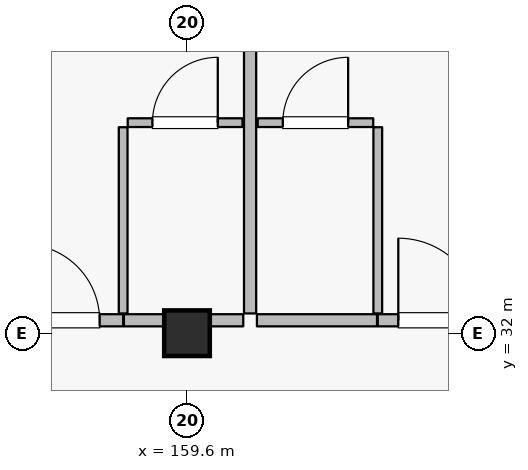
"""IFC4 building model, lengths in metres.
Left out: names, types, materials, properties, quantities, classifications, styles, units other than length and angle.
Written with IfcOpenShell. Run it as: python <this file> out.ifc"""

import sys

from ifc_helpers import new_model, si_unit, direction, frame, frame_2d, origin, origin_2d, place, context, subcontext, project, spatial, rectangle, extrude, element, fill, save


model = new_model("IFC4")
c1 = context("Model", 3, precision=1e-05, world=origin(), true_north=direction((0.0, 1.0)))
c2 = subcontext(c1, "Body", "Model", "MODEL_VIEW")
j1 = project(units=[si_unit("LENGTHUNIT", "METRE"), si_unit("PLANEANGLEUNIT", "RADIAN")], contexts=[c1])
p1 = place(None, origin())
s1 = spatial("IfcSite", under=j1, at=p1, CompositionType="ELEMENT")
p2 = place(p1, origin())
s2 = spatial("IfcBuilding", under=s1, at=p2, CompositionType="ELEMENT")
p3 = place(p2, frame((0.0, 0.0, 43.2)))
s3 = spatial("IfcBuildingStorey", under=s2, at=p3, CompositionType="ELEMENT", Elevation=43.2)
p4 = place(p3, frame((159.6, 32.0, 0.0), z_axis=(0.0, 0.0, 1.0), x_axis=(1.0, 0.0, 0.0)))
e1 = element("IfcColumn", 1, at=p4, inside=s3, PredefinedType="COLUMN", context=c2, shape_type="SweptSolid", body=[
    extrude(rectangle(XDim=0.6, YDim=0.6, at=origin_2d()), origin(), (0.0, 0.0, 1.0), 4.2),
])
p5 = place(p3, frame((157.14, 32.17, 0.0), z_axis=(0.0, 0.0, 1.0), x_axis=(1.0, 0.0, 0.0)))
e2 = element("IfcWall", 2, at=p5, inside=s3, PredefinedType="PARTITIONING", context=c2, shape_type="SweptSolid", body=[
    extrude(rectangle(XDim=1.62, YDim=0.16, at=frame_2d((0.81, 0.0))), origin(), (0.0, 0.0, 1.0), 3.39),
])
p6 = place(p5, frame((0.31, 0.0, 0.0)))
e3 = element("IfcOpeningElement", 3, at=p6, cuts=e2, PredefinedType="OPENING", context=c2, shape_type="SweptSolid", body=[
    extrude(rectangle(XDim=1.0, YDim=2.25, at=frame_2d((0.5, 1.125))), frame((0.0, 0.09, 0.0), z_axis=(0.0, -1.0, 0.0), x_axis=(1.0, 0.0, 0.0)), (0.0, 0.0, 1.0), 0.18),
])
p7 = place(p3, frame((158.77, 32.17, 0.0), z_axis=(0.0, 0.0, 1.0), x_axis=(1.0, 0.0, 0.0)))
e4 = element("IfcWall", 4, at=p7, inside=s3, PredefinedType="PARTITIONING", context=c2, shape_type="SweptSolid", body=[
    extrude(rectangle(XDim=0.534, YDim=0.16, at=frame_2d((0.267, 0.0))), origin(), (0.0, 0.0, 1.0), 3.39),
])
p8 = place(p3, frame((158.76, 32.26, 0.0), z_axis=(0.0, 0.0, 1.0), x_axis=(0.0, 1.0, 0.0)))
e5 = element("IfcWall", 5, at=p8, inside=s3, PredefinedType="PARTITIONING", context=c2, shape_type="SweptSolid", body=[
    extrude(rectangle(XDim=2.45, YDim=0.115, at=frame_2d((1.225, 0.0))), origin(), (0.0, 0.0, 1.0), 3.935),
])
p9 = place(p3, frame((158.82, 34.77, 0.0), z_axis=(0.0, 0.0, 1.0), x_axis=(1.0, 0.0, 0.0)))
e6 = element("IfcWall", 6, at=p9, inside=s3, PredefinedType="PARTITIONING", context=c2, shape_type="SweptSolid", body=[
    extrude(rectangle(XDim=1.51, YDim=0.115, at=frame_2d((0.755, 0.0))), origin(), (0.0, 0.0, 1.0), 3.935),
])
p10 = place(p9, frame((0.325, 0.0, 0.0)))
e7 = element("IfcOpeningElement", 7, at=p10, cuts=e6, PredefinedType="OPENING", context=c2, shape_type="SweptSolid", body=[
    extrude(rectangle(XDim=0.86, YDim=2.12, at=frame_2d((0.43, 1.06))), frame((0.0, 0.067, 0.0), z_axis=(0.0, -1.0, 0.0), x_axis=(1.0, 0.0, 0.0)), (0.0, 0.0, 1.0), 0.135),
])
p11 = place(p3, frame((160.52, 32.17, 0.0), z_axis=(0.0, 0.0, 1.0), x_axis=(1.0, 0.0, 0.0)))
e8 = element("IfcWall", 8, at=p11, inside=s3, PredefinedType="PARTITIONING", context=c2, shape_type="SweptSolid", body=[
    extrude(rectangle(XDim=1.58, YDim=0.16, at=frame_2d((0.79, 0.0))), origin(), (0.0, 0.0, 1.0), 3.935),
])
p12 = place(p3, frame((162.11, 32.17, 0.0), z_axis=(0.0, 0.0, 1.0), x_axis=(1.0, 0.0, 0.0)))
e9 = element("IfcWall", 9, at=p12, inside=s3, PredefinedType="PARTITIONING", context=c2, shape_type="SweptSolid", body=[
    extrude(rectangle(XDim=1.62, YDim=0.16, at=frame_2d((0.81, 0.0))), origin(), (0.0, 0.0, 1.0), 3.935),
])
p13 = place(p12, frame((0.27, 0.0, 0.0)))
e10 = element("IfcOpeningElement", 10, at=p13, cuts=e9, PredefinedType="OPENING", context=c2, shape_type="SweptSolid", body=[
    extrude(rectangle(XDim=1.08, YDim=2.3, at=frame_2d((0.54, 1.15))), frame((0.0, 0.09, 0.0), z_axis=(0.0, -1.0, 0.0), x_axis=(1.0, 0.0, 0.0)), (0.0, 0.0, 1.0), 0.18),
])
p14 = place(p3, frame((162.11, 32.26, 0.0), z_axis=(0.0, 0.0, 1.0), x_axis=(0.0, 1.0, 0.0)))
e11 = element("IfcWall", 11, at=p14, inside=s3, PredefinedType="PARTITIONING", context=c2, shape_type="SweptSolid", body=[
    extrude(rectangle(XDim=2.45, YDim=0.115, at=frame_2d((1.225, 0.0))), origin(), (0.0, 0.0, 1.0), 3.935),
])
p15 = place(p3, frame((160.53, 34.77, 0.0), z_axis=(0.0, 0.0, 1.0), x_axis=(1.0, 0.0, 0.0)))
e12 = element("IfcWall", 12, at=p15, inside=s3, PredefinedType="PARTITIONING", context=c2, shape_type="SweptSolid", body=[
    extrude(rectangle(XDim=1.52, YDim=0.115, at=frame_2d((0.76, 0.0))), origin(), (0.0, 0.0, 1.0), 3.935),
])
p16 = place(p15, frame((0.33, 0.0, 0.0)))
e13 = element("IfcOpeningElement", 13, at=p16, cuts=e12, PredefinedType="OPENING", context=c2, shape_type="SweptSolid", body=[
    extrude(rectangle(XDim=0.86, YDim=2.12, at=frame_2d((0.43, 1.06))), frame((0.0, 0.067, 0.0), z_axis=(0.0, -1.0, 0.0), x_axis=(1.0, 0.0, 0.0)), (0.0, 0.0, 1.0), 0.135),
])
p17 = place(p3, frame((160.43, 32.26, 0.0), z_axis=(0.0, 0.0, 1.0), x_axis=(0.0, 1.0, 0.0)))
e14 = element("IfcWall", 14, at=p17, inside=s3, PredefinedType="PARTITIONING", context=c2, shape_type="SweptSolid", body=[
    extrude(rectangle(XDim=8.19, YDim=0.16, at=frame_2d((4.095, 0.0))), origin(), (0.0, 0.0, 1.0), 3.935),
])
p18 = place(p3, frame((159.304, 32.17, 0.0), z_axis=(0.0, 0.0, 1.0), x_axis=(1.0, 0.0, 0.0)))
e15 = element("IfcWall", 15, at=p18, inside=s3, PredefinedType="PARTITIONING", context=c2, shape_type="SweptSolid", body=[
    extrude(rectangle(XDim=1.036, YDim=0.16, at=frame_2d((0.518, 0.0))), origin(), (0.0, 0.0, 1.0), 3.935),
])
p19 = place(p6, origin())
e16 = element("IfcDoor", 16, at=p19, inside=s3, OperationType="SINGLE_SWING_LEFT", PredefinedType="DOOR", context=c2, shape_type="SweptSolid", body=[
    extrude(rectangle(XDim=1.0, YDim=2.25, at=frame_2d((0.5, 1.125))), frame((0.0, 0.025, 0.0), z_axis=(0.0, -1.0, 0.0), x_axis=(1.0, 0.0, 0.0)), (0.0, 0.0, 1.0), 0.05),
])
fill(e3, e16)
p20 = place(p10, origin())
e17 = element("IfcDoor", 17, at=p20, inside=s3, OperationType="SINGLE_SWING_RIGHT", PredefinedType="DOOR", context=c2, shape_type="SweptSolid", body=[
    extrude(rectangle(XDim=0.86, YDim=2.12, at=frame_2d((0.43, 1.06))), frame((0.0, 0.025, 0.0), z_axis=(0.0, -1.0, 0.0), x_axis=(1.0, 0.0, 0.0)), (0.0, 0.0, 1.0), 0.05),
])
fill(e7, e17)
p21 = place(p13, origin())
e18 = element("IfcDoor", 18, at=p21, inside=s3, OperationType="SINGLE_SWING_LEFT", PredefinedType="DOOR", context=c2, shape_type="SweptSolid", body=[
    extrude(rectangle(XDim=1.08, YDim=2.3, at=frame_2d((0.54, 1.15))), frame((0.0, 0.025, 0.0), z_axis=(0.0, -1.0, 0.0), x_axis=(1.0, 0.0, 0.0)), (0.0, 0.0, 1.0), 0.05),
])
fill(e10, e18)
p22 = place(p16, origin())
e19 = element("IfcDoor", 19, at=p22, inside=s3, OperationType="SINGLE_SWING_RIGHT", PredefinedType="DOOR", context=c2, shape_type="SweptSolid", body=[
    extrude(rectangle(XDim=0.86, YDim=2.12, at=frame_2d((0.43, 1.06))), frame((0.0, 0.025, 0.0), z_axis=(0.0, -1.0, 0.0), x_axis=(1.0, 0.0, 0.0)), (0.0, 0.0, 1.0), 0.05),
])
fill(e13, e19)
save(model, sys.argv[1])
